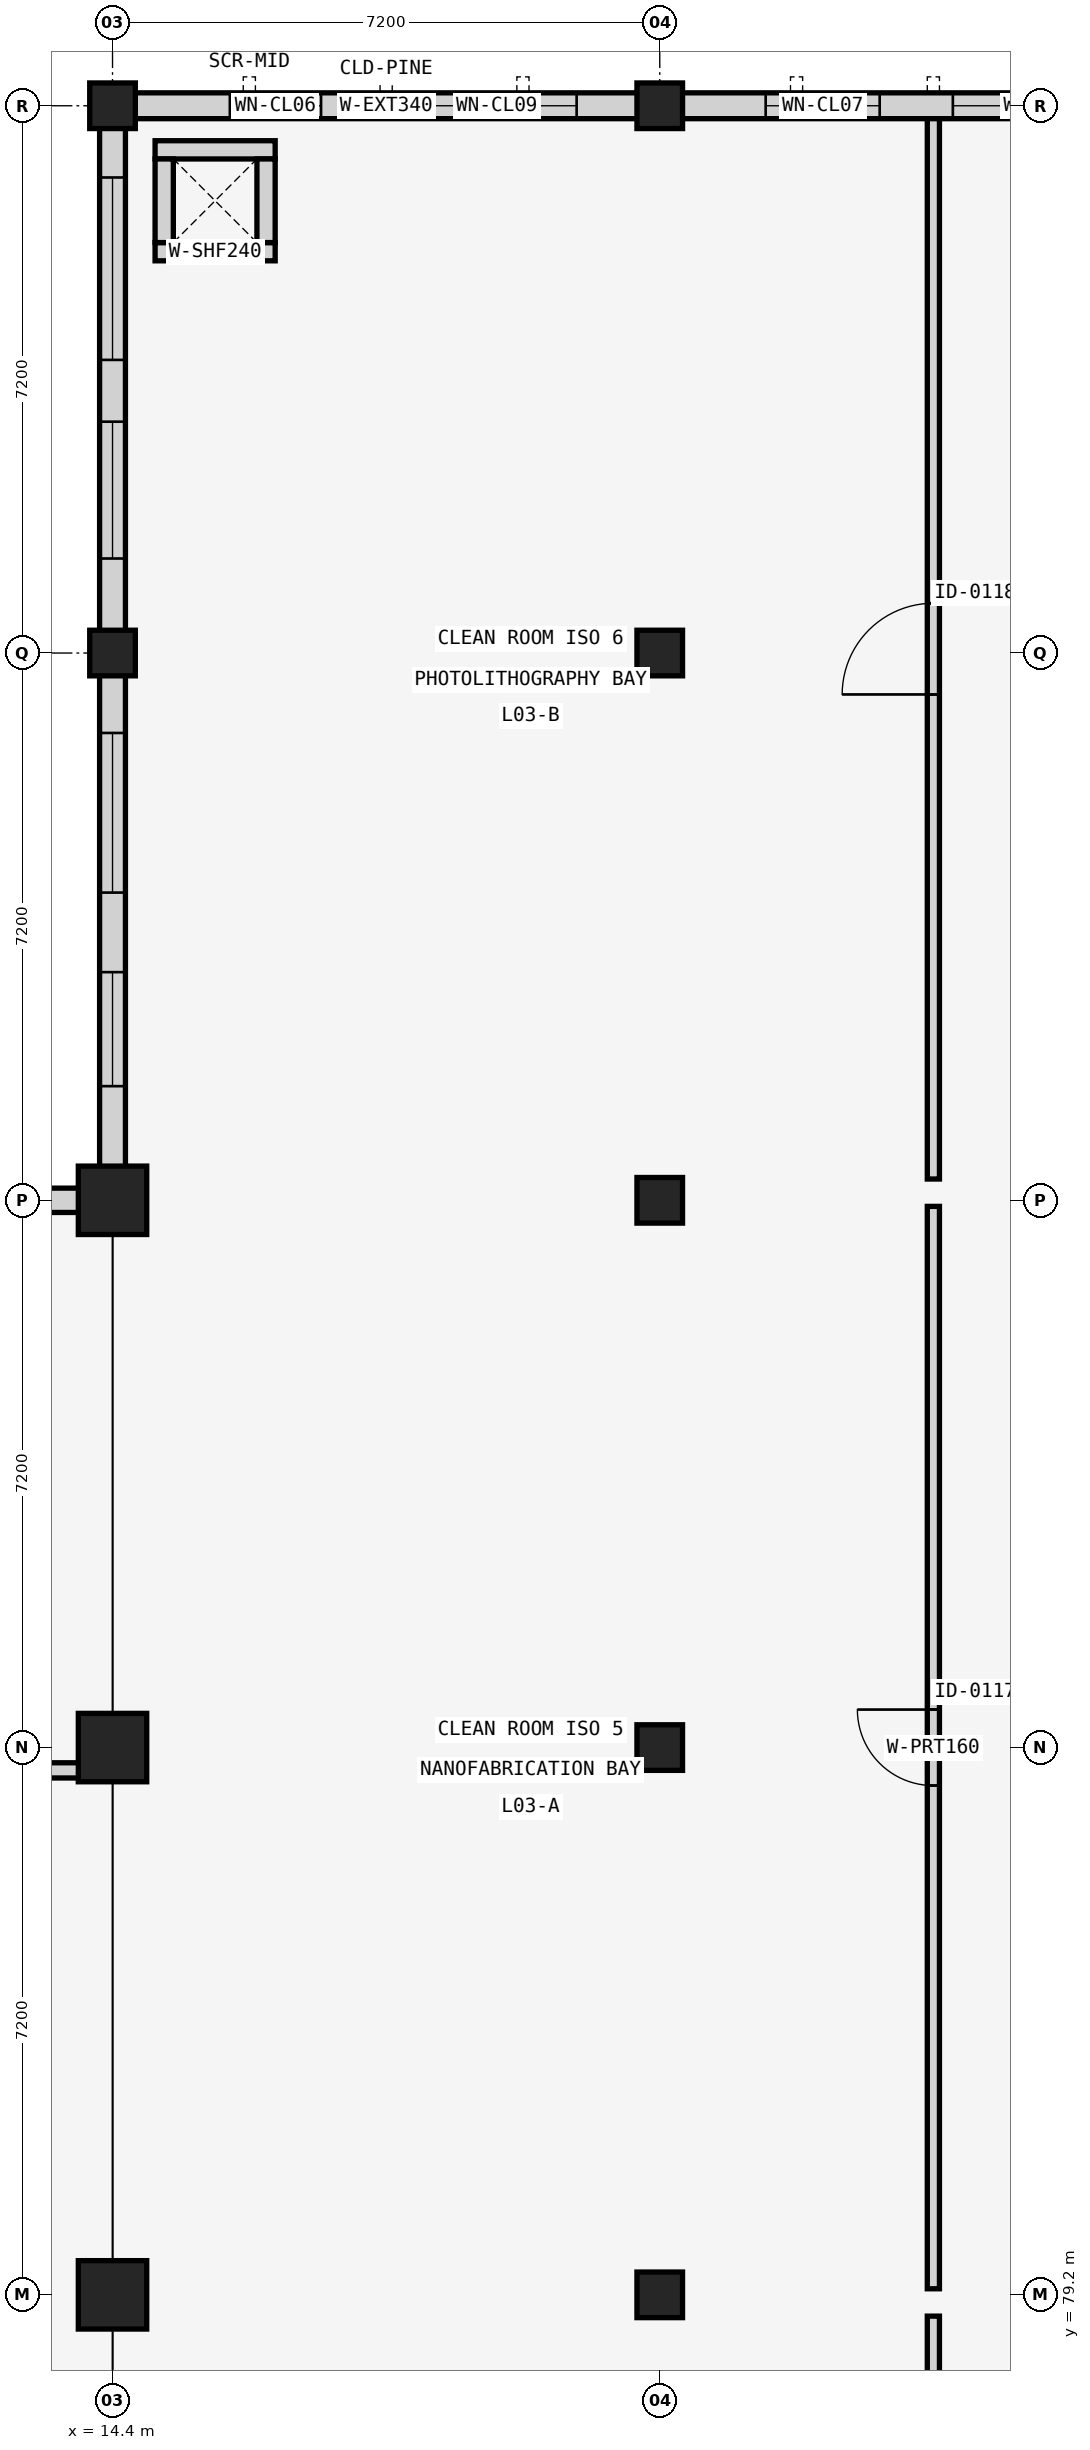
"""IFC4 building model, lengths in metres.
Left out: names, types, materials, properties, quantities, classifications, styles, units other than length and angle.
Written with IfcOpenShell. Run it as: python <this file> out.ifc"""

import sys

from ifc_helpers import new_model, si_unit, direction, frame, frame_2d, origin, origin_2d, place, context, subcontext, project, spatial, rectangle, extrude, element, fill, save


model = new_model("IFC4")
c1 = context("Model", 3, precision=1e-05, world=origin(), true_north=direction((0.0, 1.0)))
c2 = subcontext(c1, "Body", "Model", "MODEL_VIEW")
j1 = project(units=[si_unit("LENGTHUNIT", "METRE"), si_unit("PLANEANGLEUNIT", "RADIAN")], contexts=[c1])
p1 = place(None, origin())
s1 = spatial("IfcSite", under=j1, at=p1, CompositionType="ELEMENT")
p2 = place(p1, origin())
s2 = spatial("IfcBuilding", under=s1, at=p2, CompositionType="ELEMENT")
p3 = place(p2, frame((0.0, 0.0, 13.12)))
s3 = spatial("IfcBuildingStorey", under=s2, at=p3, CompositionType="ELEMENT", Elevation=13.12)
for number, where, z_axis, x_axis in (
    (1, (14.4, 79.2, 0.0), (0.0, 0.0, 1.0), (1.0, 0.0, 0.0)),
    (2, (14.4, 86.4, 0.0), (0.0, 0.0, 1.0), (1.0, 0.0, 0.0)),
    (3, (14.4, 93.6, 0.0), (0.0, 0.0, 1.0), (1.0, 0.0, 0.0)),
):
    element("IfcColumn", number, at=place(p3, frame(where, z_axis=z_axis, x_axis=x_axis)), inside=s3, PredefinedType="COLUMN", context=c2, shape_type="SweptSolid", body=[
        extrude(rectangle(XDim=0.9, YDim=0.9, at=origin_2d()), origin(), (0.0, 0.0, 1.0), 4.16),
    ])
for number, where, z_axis, x_axis in (
    (4, (14.4, 100.8, 0.0), (0.0, 0.0, 1.0), (1.0, 0.0, 0.0)),
    (5, (14.4, 108.0, 0.0), (0.0, 0.0, 1.0), (1.0, 0.0, 0.0)),
    (6, (21.6, 79.2, 0.0), (0.0, 0.0, 1.0), (1.0, 0.0, 0.0)),
    (7, (21.6, 86.4, 0.0), (0.0, 0.0, 1.0), (1.0, 0.0, 0.0)),
    (8, (21.6, 93.6, 0.0), (0.0, 0.0, 1.0), (1.0, 0.0, 0.0)),
    (9, (21.6, 100.8, 0.0), (0.0, 0.0, 1.0), (1.0, 0.0, 0.0)),
    (10, (21.6, 108.0, 0.0), (0.0, 0.0, 1.0), (1.0, 0.0, 0.0)),
):
    element("IfcColumn", number, at=place(p3, frame(where, z_axis=z_axis, x_axis=x_axis)), inside=s3, PredefinedType="COLUMN", context=c2, shape_type="SweptSolid", body=[
        extrude(rectangle(XDim=0.6, YDim=0.6, at=origin_2d()), origin(), (0.0, 0.0, 1.0), 4.16),
    ])
p4 = place(p3, frame((0.44, 93.6, 0.0), z_axis=(0.0, 0.0, 1.0), x_axis=(1.0, 0.0, 0.0)))
e11 = element("IfcWall", 11, at=p4, inside=s3, PredefinedType="SOLIDWALL", context=c2, shape_type="SweptSolid", body=[
    extrude(rectangle(XDim=13.52, YDim=0.32, at=frame_2d((6.76, 0.0))), origin(), (0.0, 0.0, 1.0), 3.42),
])
p5 = place(p4, frame((2.175, 0.0, 0.85)))
e12 = element("IfcOpeningElement", 12, at=p5, cuts=e11, PredefinedType="OPENING", context=c2, shape_type="SweptSolid", body=[
    extrude(rectangle(XDim=0.45, YDim=2.1, at=frame_2d((0.225, 1.05))), frame((0.0, 0.17, 0.0), z_axis=(0.0, -1.0, 0.0), x_axis=(1.0, 0.0, 0.0)), (0.0, 0.0, 1.0), 0.34),
])
p6 = place(p4, frame((4.975, 0.0, 0.85)))
e13 = element("IfcOpeningElement", 13, at=p6, cuts=e11, PredefinedType="OPENING", context=c2, shape_type="SweptSolid", body=[
    extrude(rectangle(XDim=0.45, YDim=2.4, at=frame_2d((0.225, 1.2))), frame((0.0, 0.17, 0.0), z_axis=(0.0, -1.0, 0.0), x_axis=(1.0, 0.0, 0.0)), (0.0, 0.0, 1.0), 0.34),
])
p7 = place(p4, frame((8.95, 0.0, 0.85)))
e14 = element("IfcOpeningElement", 14, at=p7, cuts=e11, PredefinedType="OPENING", context=c2, shape_type="SweptSolid", body=[
    extrude(rectangle(XDim=0.5, YDim=2.4, at=frame_2d((0.25, 1.2))), frame((0.0, 0.17, 0.0), z_axis=(0.0, -1.0, 0.0), x_axis=(1.0, 0.0, 0.0)), (0.0, 0.0, 1.0), 0.34),
])
p8 = place(p4, frame((11.725, 0.0, 0.85)))
e15 = element("IfcOpeningElement", 15, at=p8, cuts=e11, PredefinedType="OPENING", context=c2, shape_type="SweptSolid", body=[
    extrude(rectangle(XDim=0.55, YDim=2.2, at=frame_2d((0.275, 1.1))), frame((0.0, 0.17, 0.0), z_axis=(0.0, -1.0, 0.0), x_axis=(1.0, 0.0, 0.0)), (0.0, 0.0, 1.0), 0.34),
])
p9 = place(p3, frame((14.69, 108.0, 0.0), z_axis=(0.0, 0.0, 1.0), x_axis=(1.0, 0.0, 0.0)))
e16 = element("IfcWall", 16, at=p9, inside=s3, PredefinedType="SOLIDWALL", context=c2, shape_type="SweptSolid", body=[
    extrude(rectangle(XDim=6.62, YDim=0.34, at=frame_2d((3.31, 0.0))), origin(), (0.0, 0.0, 1.0), 3.21),
])
p10 = place(p9, frame((1.254, 0.0, 1.0)))
e17 = element("IfcOpeningElement", 17, at=p10, cuts=e16, PredefinedType="OPENING", context=c2, shape_type="SweptSolid", body=[
    extrude(rectangle(XDim=1.2, YDim=1.65, at=frame_2d((0.6, 0.825))), frame((0.0, 0.18, 0.0), z_axis=(0.0, -1.0, 0.0), x_axis=(1.0, 0.0, 0.0)), (0.0, 0.0, 1.0), 0.36),
])
p11 = place(p9, frame((3.716, 0.0, 1.0)))
e18 = element("IfcOpeningElement", 18, at=p11, cuts=e16, PredefinedType="OPENING", context=c2, shape_type="SweptSolid", body=[
    extrude(rectangle(XDim=2.1, YDim=1.65, at=frame_2d((1.05, 0.825))), frame((0.0, 0.18, 0.0), z_axis=(0.0, -1.0, 0.0), x_axis=(1.0, 0.0, 0.0)), (0.0, 0.0, 1.0), 0.36),
])
p12 = place(p3, frame((21.89, 108.0, 0.0), z_axis=(0.0, 0.0, 1.0), x_axis=(1.0, 0.0, 0.0)))
e19 = element("IfcWall", 19, at=p12, inside=s3, PredefinedType="SOLIDWALL", context=c2, shape_type="SweptSolid", body=[
    extrude(rectangle(XDim=6.62, YDim=0.34, at=frame_2d((3.31, 0.0))), origin(), (0.0, 0.0, 1.0), 3.21),
])
p13 = place(p12, frame((1.104, 0.0, 1.0)))
e20 = element("IfcOpeningElement", 20, at=p13, cuts=e19, PredefinedType="OPENING", context=c2, shape_type="SweptSolid", body=[
    extrude(rectangle(XDim=1.5, YDim=1.65, at=frame_2d((0.75, 0.825))), frame((0.0, 0.18, 0.0), z_axis=(0.0, -1.0, 0.0), x_axis=(1.0, 0.0, 0.0)), (0.0, 0.0, 1.0), 0.36),
])
p14 = place(p12, frame((3.566, 0.0, 1.0)))
e21 = element("IfcOpeningElement", 21, at=p14, cuts=e19, PredefinedType="OPENING", context=c2, shape_type="SweptSolid", body=[
    extrude(rectangle(XDim=2.4, YDim=1.65, at=frame_2d((1.2, 0.825))), frame((0.0, 0.18, 0.0), z_axis=(0.0, -1.0, 0.0), x_axis=(1.0, 0.0, 0.0)), (0.0, 0.0, 1.0), 0.36),
])
p15 = place(p3, frame((14.4, 94.04, 0.0), z_axis=(0.0, 0.0, 1.0), x_axis=(0.0, 1.0, 0.0)))
e22 = element("IfcWall", 22, at=p15, inside=s3, PredefinedType="SOLIDWALL", context=c2, shape_type="SweptSolid", body=[
    extrude(rectangle(XDim=6.47, YDim=0.34, at=frame_2d((3.235, 0.0))), origin(), (0.0, 0.0, 1.0), 3.21),
])
p16 = place(p15, frame((1.062, 0.0, 1.0)))
e23 = element("IfcOpeningElement", 23, at=p16, cuts=e22, PredefinedType="OPENING", context=c2, shape_type="SweptSolid", body=[
    extrude(rectangle(XDim=1.5, YDim=1.65, at=frame_2d((0.75, 0.825))), frame((0.0, 0.18, 0.0), z_axis=(0.0, -1.0, 0.0), x_axis=(1.0, 0.0, 0.0)), (0.0, 0.0, 1.0), 0.36),
])
p17 = place(p15, frame((3.608, 0.0, 1.0)))
e24 = element("IfcOpeningElement", 24, at=p17, cuts=e22, PredefinedType="OPENING", context=c2, shape_type="SweptSolid", body=[
    extrude(rectangle(XDim=2.1, YDim=1.65, at=frame_2d((1.05, 0.825))), frame((0.0, 0.18, 0.0), z_axis=(0.0, -1.0, 0.0), x_axis=(1.0, 0.0, 0.0)), (0.0, 0.0, 1.0), 0.36),
])
p18 = place(p3, frame((14.4, 101.09, 0.0), z_axis=(0.0, 0.0, 1.0), x_axis=(0.0, 1.0, 0.0)))
e25 = element("IfcWall", 25, at=p18, inside=s3, PredefinedType="SOLIDWALL", context=c2, shape_type="SweptSolid", body=[
    extrude(rectangle(XDim=6.62, YDim=0.34, at=frame_2d((3.31, 0.0))), origin(), (0.0, 0.0, 1.0), 3.21),
])
p19 = place(p18, frame((0.954, 0.0, 1.0)))
e26 = element("IfcOpeningElement", 26, at=p19, cuts=e25, PredefinedType="OPENING", context=c2, shape_type="SweptSolid", body=[
    extrude(rectangle(XDim=1.8, YDim=1.65, at=frame_2d((0.9, 0.825))), frame((0.0, 0.18, 0.0), z_axis=(0.0, -1.0, 0.0), x_axis=(1.0, 0.0, 0.0)), (0.0, 0.0, 1.0), 0.36),
])
p20 = place(p18, frame((3.566, 0.0, 1.0)))
e27 = element("IfcOpeningElement", 27, at=p20, cuts=e25, PredefinedType="OPENING", context=c2, shape_type="SweptSolid", body=[
    extrude(rectangle(XDim=2.4, YDim=1.65, at=frame_2d((1.2, 0.825))), frame((0.0, 0.18, 0.0), z_axis=(0.0, -1.0, 0.0), x_axis=(1.0, 0.0, 0.0)), (0.0, 0.0, 1.0), 0.36),
])
p21 = place(p3, frame((0.25, 86.1, 0.0), z_axis=(0.0, 0.0, 1.0), x_axis=(1.0, 0.0, 0.0)))
e28 = element("IfcWall", 28, at=p21, inside=s3, PredefinedType="PARTITIONING", context=c2, shape_type="SweptSolid", body=[
    extrude(rectangle(XDim=13.95, YDim=0.2, at=frame_2d((6.975, 0.0))), origin(), (0.0, 0.0, 1.0), 3.21),
])
p22 = place(p21, frame((3.962, 0.0, 0.0)))
e29 = element("IfcOpeningElement", 29, at=p22, cuts=e28, PredefinedType="OPENING", context=c2, shape_type="SweptSolid", body=[
    extrude(rectangle(XDim=1.84, YDim=2.26, at=frame_2d((0.92, 1.13))), frame((0.0, 0.11, 0.0), z_axis=(0.0, -1.0, 0.0), x_axis=(1.0, 0.0, 0.0)), (0.0, 0.0, 1.0), 0.22),
])
p23 = place(p3, frame((25.2, 65.18, 0.0), z_axis=(0.0, 0.0, 1.0), x_axis=(0.0, 1.0, 0.0)))
e30 = element("IfcWall", 30, at=p23, inside=s3, PredefinedType="PARTITIONING", context=c2, shape_type="SweptSolid", body=[
    extrude(rectangle(XDim=13.74, YDim=0.16, at=frame_2d((6.87, 0.0))), origin(), (0.0, 0.0, 1.0), 3.16),
])
p24 = place(p23, frame((6.095, 0.0, 0.0)))
e31 = element("IfcOpeningElement", 31, at=p24, cuts=e30, PredefinedType="OPENING", context=c2, shape_type="SweptSolid", body=[
    extrude(rectangle(XDim=1.55, YDim=2.25, at=frame_2d((0.775, 1.125))), frame((0.0, 0.09, 0.0), z_axis=(0.0, -1.0, 0.0), x_axis=(1.0, 0.0, 0.0)), (0.0, 0.0, 1.0), 0.18),
])
p25 = place(p3, frame((25.2, 79.28, 0.0), z_axis=(0.0, 0.0, 1.0), x_axis=(0.0, 1.0, 0.0)))
e32 = element("IfcWall", 32, at=p25, inside=s3, PredefinedType="PARTITIONING", context=c2, shape_type="SweptSolid", body=[
    extrude(rectangle(XDim=14.24, YDim=0.16, at=frame_2d((7.12, 0.0))), origin(), (0.0, 0.0, 1.0), 3.16),
])
p26 = place(p25, frame((6.62, 0.0, 0.0)))
e33 = element("IfcOpeningElement", 33, at=p26, cuts=e32, PredefinedType="OPENING", context=c2, shape_type="SweptSolid", body=[
    extrude(rectangle(XDim=1.0, YDim=2.15, at=frame_2d((0.5, 1.075))), frame((0.0, 0.09, 0.0), z_axis=(0.0, -1.0, 0.0), x_axis=(1.0, 0.0, 0.0)), (0.0, 0.0, 1.0), 0.18),
])
p27 = place(p3, frame((25.2, 93.88, 0.0), z_axis=(0.0, 0.0, 1.0), x_axis=(0.0, 1.0, 0.0)))
e34 = element("IfcWall", 34, at=p27, inside=s3, PredefinedType="PARTITIONING", context=c2, shape_type="SweptSolid", body=[
    extrude(rectangle(XDim=13.95, YDim=0.16, at=frame_2d((6.975, 0.0))), origin(), (0.0, 0.0, 1.0), 3.16),
])
p28 = place(p27, frame((6.375, 0.0, 0.0)))
e35 = element("IfcOpeningElement", 35, at=p28, cuts=e34, PredefinedType="OPENING", context=c2, shape_type="SweptSolid", body=[
    extrude(rectangle(XDim=1.2, YDim=2.15, at=frame_2d((0.6, 1.075))), frame((0.0, 0.09, 0.0), z_axis=(0.0, -1.0, 0.0), x_axis=(1.0, 0.0, 0.0)), (0.0, 0.0, 1.0), 0.18),
])
for number, where, z_axis, x_axis in (
    (36, (14.96, 106.08, 0.0), (0.0, 0.0, 1.0), (1.0, 0.0, 0.0)),
    (37, (14.96, 107.42, 0.0), (0.0, 0.0, 1.0), (1.0, 0.0, 0.0)),
):
    element("IfcWall", number, at=place(p3, frame(where, z_axis=z_axis, x_axis=x_axis)), inside=s3, PredefinedType="SOLIDWALL", context=c2, shape_type="SweptSolid", body=[
        extrude(rectangle(XDim=1.58, YDim=0.24, at=frame_2d((0.79, 0.0))), origin(), (0.0, 0.0, 1.0), 3.81),
    ])
for number, where, z_axis, x_axis in (
    (38, (15.08, 106.2, 0.0), (0.0, 0.0, 1.0), (0.0, 1.0, 0.0)),
    (39, (16.42, 106.2, 0.0), (0.0, 0.0, 1.0), (0.0, 1.0, 0.0)),
):
    element("IfcWall", number, at=place(p3, frame(where, z_axis=z_axis, x_axis=x_axis)), inside=s3, PredefinedType="SOLIDWALL", context=c2, shape_type="SweptSolid", body=[
        extrude(rectangle(XDim=1.1, YDim=0.24, at=frame_2d((0.55, 0.0))), origin(), (0.0, 0.0, 1.0), 3.81),
    ])
p29 = place(p10, origin())
e40 = element("IfcWindow", 40, at=p29, inside=s3, PartitioningType="SINGLE_PANEL", PredefinedType="WINDOW", context=c2, shape_type="SweptSolid", body=[
    extrude(rectangle(XDim=1.2, YDim=1.65, at=frame_2d((0.6, 0.825))), frame((0.0, 0.03, 0.0), z_axis=(0.0, -1.0, 0.0), x_axis=(1.0, 0.0, 0.0)), (0.0, 0.0, 1.0), 0.06),
])
fill(e17, e40)
p30 = place(p11, origin())
e41 = element("IfcWindow", 41, at=p30, inside=s3, PartitioningType="SINGLE_PANEL", PredefinedType="WINDOW", context=c2, shape_type="SweptSolid", body=[
    extrude(rectangle(XDim=2.1, YDim=1.65, at=frame_2d((1.05, 0.825))), frame((0.0, 0.03, 0.0), z_axis=(0.0, -1.0, 0.0), x_axis=(1.0, 0.0, 0.0)), (0.0, 0.0, 1.0), 0.06),
])
fill(e18, e41)
p31 = place(p13, origin())
e42 = element("IfcWindow", 42, at=p31, inside=s3, PartitioningType="SINGLE_PANEL", PredefinedType="WINDOW", context=c2, shape_type="SweptSolid", body=[
    extrude(rectangle(XDim=1.5, YDim=1.65, at=frame_2d((0.75, 0.825))), frame((0.0, 0.03, 0.0), z_axis=(0.0, -1.0, 0.0), x_axis=(1.0, 0.0, 0.0)), (0.0, 0.0, 1.0), 0.06),
])
fill(e20, e42)
p32 = place(p14, origin())
e43 = element("IfcWindow", 43, at=p32, inside=s3, PartitioningType="SINGLE_PANEL", PredefinedType="WINDOW", context=c2, shape_type="SweptSolid", body=[
    extrude(rectangle(XDim=2.4, YDim=1.65, at=frame_2d((1.2, 0.825))), frame((0.0, 0.03, 0.0), z_axis=(0.0, -1.0, 0.0), x_axis=(1.0, 0.0, 0.0)), (0.0, 0.0, 1.0), 0.06),
])
fill(e21, e43)
p33 = place(p16, origin())
e44 = element("IfcWindow", 44, at=p33, inside=s3, PartitioningType="SINGLE_PANEL", PredefinedType="WINDOW", context=c2, shape_type="SweptSolid", body=[
    extrude(rectangle(XDim=1.5, YDim=1.65, at=frame_2d((0.75, 0.825))), frame((0.0, 0.03, 0.0), z_axis=(0.0, -1.0, 0.0), x_axis=(1.0, 0.0, 0.0)), (0.0, 0.0, 1.0), 0.06),
])
fill(e23, e44)
p34 = place(p17, origin())
e45 = element("IfcWindow", 45, at=p34, inside=s3, PartitioningType="SINGLE_PANEL", PredefinedType="WINDOW", context=c2, shape_type="SweptSolid", body=[
    extrude(rectangle(XDim=2.1, YDim=1.65, at=frame_2d((1.05, 0.825))), frame((0.0, 0.03, 0.0), z_axis=(0.0, -1.0, 0.0), x_axis=(1.0, 0.0, 0.0)), (0.0, 0.0, 1.0), 0.06),
])
fill(e24, e45)
p35 = place(p19, origin())
e46 = element("IfcWindow", 46, at=p35, inside=s3, PartitioningType="SINGLE_PANEL", PredefinedType="WINDOW", context=c2, shape_type="SweptSolid", body=[
    extrude(rectangle(XDim=1.8, YDim=1.65, at=frame_2d((0.9, 0.825))), frame((0.0, 0.03, 0.0), z_axis=(0.0, -1.0, 0.0), x_axis=(1.0, 0.0, 0.0)), (0.0, 0.0, 1.0), 0.06),
])
fill(e26, e46)
p36 = place(p20, origin())
e47 = element("IfcWindow", 47, at=p36, inside=s3, PartitioningType="SINGLE_PANEL", PredefinedType="WINDOW", context=c2, shape_type="SweptSolid", body=[
    extrude(rectangle(XDim=2.4, YDim=1.65, at=frame_2d((1.2, 0.825))), frame((0.0, 0.03, 0.0), z_axis=(0.0, -1.0, 0.0), x_axis=(1.0, 0.0, 0.0)), (0.0, 0.0, 1.0), 0.06),
])
fill(e27, e47)
p37 = place(p26, origin())
e48 = element("IfcDoor", 48, at=p37, inside=s3, OperationType="SINGLE_SWING_RIGHT", PredefinedType="DOOR", context=c2, shape_type="SweptSolid", body=[
    extrude(rectangle(XDim=1.0, YDim=2.15, at=frame_2d((0.5, 1.075))), frame((0.0, 0.025, 0.0), z_axis=(0.0, -1.0, 0.0), x_axis=(1.0, 0.0, 0.0)), (0.0, 0.0, 1.0), 0.05),
])
fill(e33, e48)
p38 = place(p28, origin())
e49 = element("IfcDoor", 49, at=p38, inside=s3, OperationType="SINGLE_SWING_LEFT", PredefinedType="DOOR", context=c2, shape_type="SweptSolid", body=[
    extrude(rectangle(XDim=1.2, YDim=2.15, at=frame_2d((0.6, 1.075))), frame((0.0, 0.025, 0.0), z_axis=(0.0, -1.0, 0.0), x_axis=(1.0, 0.0, 0.0)), (0.0, 0.0, 1.0), 0.05),
])
fill(e35, e49)
save(model, sys.argv[1])
